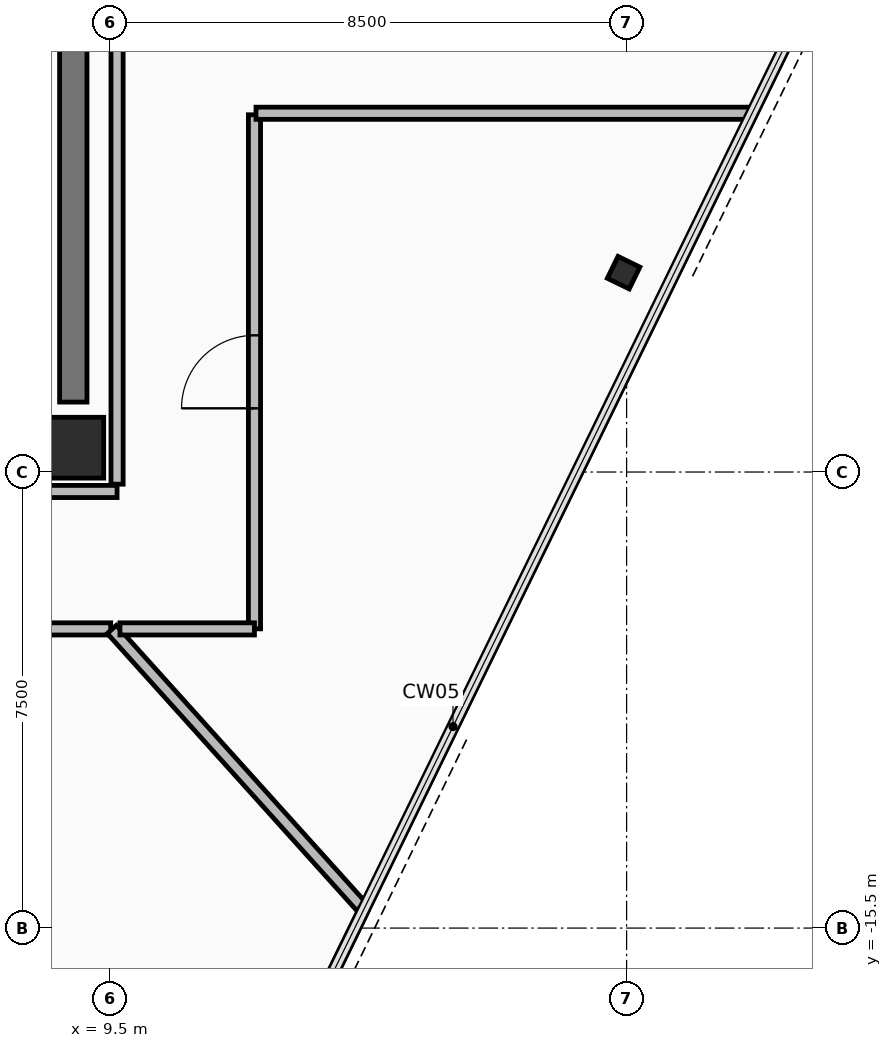
"""IFC4 building model, lengths in metres.
Left out: names, types, materials, properties, quantities, classifications, styles, units other than length and angle.
Written with IfcOpenShell. Run it as: python <this file> out.ifc"""

import sys

from ifc_helpers import new_model, si_unit, direction, frame, frame_2d, origin, origin_2d, place, context, subcontext, project, spatial, rectangle, hollow_rectangle, extrude, element, fill, save


model = new_model("IFC4")
c1 = context("Model", 3, precision=1e-05, world=origin(), true_north=direction((0.0, 1.0)))
c2 = subcontext(c1, "Body", "Model", "MODEL_VIEW")
j1 = project(units=[si_unit("LENGTHUNIT", "METRE"), si_unit("PLANEANGLEUNIT", "RADIAN")], contexts=[c1])
p1 = place(None, origin())
s1 = spatial("IfcSite", under=j1, at=p1, CompositionType="ELEMENT")
p2 = place(p1, origin())
s2 = spatial("IfcBuilding", under=s1, at=p2, CompositionType="ELEMENT")
p3 = place(p2, frame((0.0, 0.0, 257.0)))
s3 = spatial("IfcBuildingStorey", under=s2, at=p3, CompositionType="ELEMENT", Elevation=257.0)
p4 = place(p3, frame((8.9, -7.6, 0.0), z_axis=(0.0, 0.0, 1.0), x_axis=(1.0, 0.0, 0.0)))
e1 = element("IfcColumn", 1, at=p4, inside=s3, PredefinedType="COLUMN", context=c2, shape_type="SweptSolid", body=[
    extrude(rectangle(XDim=1.0, YDim=1.0, at=origin_2d()), origin(), (0.0, 0.0, 1.0), 3.6),
])
p5 = place(p3, frame((17.951, -4.722, 0.0), z_axis=(0.0, 0.0, 1.0), x_axis=(0.43837271548, 0.898793281196, 0.0)))
e2 = element("IfcColumn", 2, at=p5, inside=s3, PredefinedType="COLUMN", context=c2, shape_type="SweptSolid", body=[
    extrude(hollow_rectangle(XDim=0.4, YDim=0.4, WallThickness=0.025, at=origin_2d()), origin(), (0.0, 0.0, 1.0), 3.6),
])
p6 = place(p3, frame((8.9, -6.85, 0.0), z_axis=(0.0, 0.0, 1.0), x_axis=(0.0, 1.0, 0.0)))
e3 = element("IfcWall", 3, at=p6, inside=s3, PredefinedType="SHEAR", context=c2, shape_type="SweptSolid", body=[
    extrude(rectangle(XDim=10.7, YDim=0.45, at=frame_2d((5.35, 0.0))), origin(), (0.0, 0.0, 1.0), 3.42),
])
p7 = place(p3, frame((-9.62, -8.32, 0.0), z_axis=(0.0, 0.0, 1.0), x_axis=(1.0, 0.0, 0.0)))
e4 = element("IfcWall", 4, at=p7, inside=s3, PredefinedType="PARTITIONING", context=c2, shape_type="SweptSolid", body=[
    extrude(rectangle(XDim=19.24, YDim=0.2, at=frame_2d((9.62, 0.0))), origin(), (0.0, 0.0, 1.0), 2.915),
])
p8 = place(p7, frame((7.37, 0.0, 0.0)))
e5 = element("IfcOpeningElement", 5, at=p8, cuts=e4, PredefinedType="OPENING", context=c2, shape_type="SweptSolid", body=[
    extrude(rectangle(XDim=0.9, YDim=2.1, at=frame_2d((0.45, 1.05))), frame((0.0, 0.11, 0.0), z_axis=(0.0, -1.0, 0.0), x_axis=(1.0, 0.0, 0.0)), (0.0, 0.0, 1.0), 0.22),
])
p9 = place(p7, frame((10.77, 0.0, 0.0)))
e6 = element("IfcOpeningElement", 6, at=p9, cuts=e4, PredefinedType="OPENING", context=c2, shape_type="SweptSolid", body=[
    extrude(rectangle(XDim=0.9, YDim=2.1, at=frame_2d((0.45, 1.05))), frame((0.0, 0.11, 0.0), z_axis=(0.0, -1.0, 0.0), x_axis=(1.0, 0.0, 0.0)), (0.0, 0.0, 1.0), 0.22),
])
p10 = place(p3, frame((9.62, -8.2, 0.0), z_axis=(0.0, 0.0, 1.0), x_axis=(0.0, 1.0, 0.0)))
e7 = element("IfcWall", 7, at=p10, inside=s3, PredefinedType="PARTITIONING", context=c2, shape_type="SweptSolid", body=[
    extrude(rectangle(XDim=16.4, YDim=0.2, at=frame_2d((8.2, 0.0))), origin(), (0.0, 0.0, 1.0), 2.915),
])
p11 = place(p10, frame((12.65, 0.0, 0.0)))
e8 = element("IfcOpeningElement", 8, at=p11, cuts=e7, PredefinedType="OPENING", context=c2, shape_type="SweptSolid", body=[
    extrude(rectangle(XDim=1.1, YDim=2.15, at=frame_2d((0.55, 1.075))), frame((0.0, 0.11, 0.0), z_axis=(0.0, -1.0, 0.0), x_axis=(1.0, 0.0, 0.0)), (0.0, 0.0, 1.0), 0.22),
])
p12 = place(p3, frame((-3.833, -10.58, 0.0), z_axis=(0.0, 0.0, 1.0), x_axis=(1.0, 0.0, 0.0)))
e9 = element("IfcWall", 9, at=p12, inside=s3, PredefinedType="PARTITIONING", context=c2, shape_type="SweptSolid", body=[
    extrude(rectangle(XDim=13.348, YDim=0.2, at=frame_2d((6.674, 0.0))), origin(), (0.0, 0.0, 1.0), 2.915),
])
p13 = place(p12, frame((6.249, 0.0, 0.0)))
e10 = element("IfcOpeningElement", 10, at=p13, cuts=e9, PredefinedType="OPENING", context=c2, shape_type="SweptSolid", body=[
    extrude(rectangle(XDim=0.85, YDim=2.1, at=frame_2d((0.425, 1.05))), frame((0.0, 0.11, 0.0), z_axis=(0.0, -1.0, 0.0), x_axis=(1.0, 0.0, 0.0)), (0.0, 0.0, 1.0), 0.22),
])
p14 = place(p3, frame((9.534, -10.588, 0.0), z_axis=(0.0, 0.0, 1.0), x_axis=(0.669128466379, -0.743146752318, 0.0)))
e11 = element("IfcWall", 11, at=p14, inside=s3, PredefinedType="PARTITIONING", context=c2, shape_type="SweptSolid", body=[
    extrude(rectangle(XDim=6.178, YDim=0.2, at=frame_2d((3.089, 0.0))), origin(), (0.0, 0.0, 1.0), 2.765),
])
p15 = place(p3, frame((13.671, -15.207, 0.0), z_axis=(0.0, 0.0, 1.0), x_axis=(-0.438371022135, -0.898794107097, 0.0)))
e12 = element("IfcWall", 12, at=p15, inside=s3, PredefinedType="PARTITIONING", context=c2, shape_type="SweptSolid", body=[
    extrude(rectangle(XDim=21.578, YDim=0.15, at=frame_2d((10.789, 0.0))), origin(), (0.0, 0.0, 1.0), 3.42),
])
p16 = place(p3, frame((11.88, -10.579, 0.0), z_axis=(0.0, 0.0, 1.0), x_axis=(0.0, 1.0, 0.0)))
e13 = element("IfcWall", 13, at=p16, inside=s3, PredefinedType="PARTITIONING", context=c2, shape_type="SweptSolid", body=[
    extrude(rectangle(XDim=8.454, YDim=0.2, at=frame_2d((4.227, 0.0))), origin(), (0.0, 0.0, 1.0), 2.915),
])
p17 = place(p16, frame((3.627, 0.0, 0.0)))
e14 = element("IfcOpeningElement", 14, at=p17, cuts=e13, PredefinedType="OPENING", context=c2, shape_type="SweptSolid", body=[
    extrude(rectangle(XDim=1.2, YDim=2.15, at=frame_2d((0.6, 1.075))), frame((0.0, 0.11, 0.0), z_axis=(0.0, -1.0, 0.0), x_axis=(1.0, 0.0, 0.0)), (0.0, 0.0, 1.0), 0.22),
])
p18 = place(p3, frame((11.905, -2.1, 0.0), z_axis=(0.0, 0.0, 1.0), x_axis=(1.0, 0.0, 0.0)))
e15 = element("IfcWall", 15, at=p18, inside=s3, PredefinedType="PARTITIONING", context=c2, shape_type="SweptSolid", body=[
    extrude(rectangle(XDim=8.159, YDim=0.2, at=frame_2d((4.08, 0.0))), origin(), (0.0, 0.0, 1.0), 2.765),
])
p19 = place(p3, frame((9.667, -10.58, 0.0), z_axis=(0.0, 0.0, 1.0), x_axis=(1.0, 0.0, 0.0)))
e16 = element("IfcWall", 16, at=p19, inside=s3, PredefinedType="PARTITIONING", context=c2, shape_type="SweptSolid", body=[
    extrude(rectangle(XDim=2.212, YDim=0.2, at=frame_2d((1.106, 0.0))), origin(), (0.0, 0.0, 1.0), 2.915),
])
p20 = place(p17, origin())
e17 = element("IfcDoor", 17, at=p20, inside=s3, OperationType="SINGLE_SWING_LEFT", PredefinedType="DOOR", context=c2, shape_type="SweptSolid", body=[
    extrude(rectangle(XDim=1.2, YDim=2.15, at=frame_2d((0.6, 1.075))), frame((0.0, 0.025, 0.0), z_axis=(0.0, -1.0, 0.0), x_axis=(1.0, 0.0, 0.0)), (0.0, 0.0, 1.0), 0.05),
])
fill(e14, e17)
save(model, sys.argv[1])
